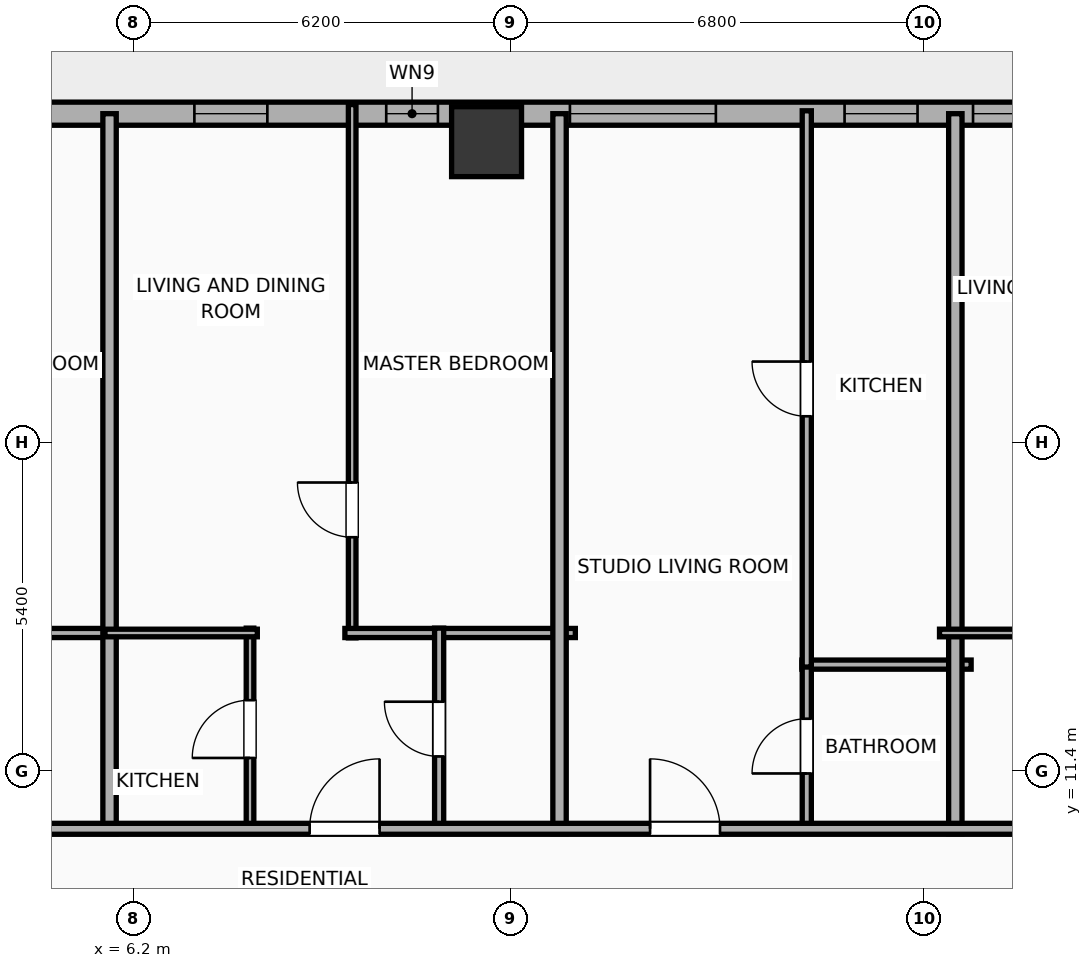
"""IFC4 building model, lengths in metres.
Left out: names, types, materials, properties, quantities, classifications, styles, units other than length and angle.
Written with IfcOpenShell. Run it as: python <this file> out.ifc"""

import sys

from ifc_helpers import new_model, si_unit, direction, frame, frame_2d, origin, origin_2d, place, context, subcontext, project, spatial, rectangle, hollow_rectangle, extrude, element, fill, save


model = new_model("IFC4")
c1 = context("Model", 3, precision=1e-05, world=origin(), true_north=direction((0.0, 1.0)))
c2 = subcontext(c1, "Body", "Model", "MODEL_VIEW")
j1 = project(units=[si_unit("LENGTHUNIT", "METRE"), si_unit("PLANEANGLEUNIT", "RADIAN")], contexts=[c1])
p1 = place(None, origin())
s1 = spatial("IfcSite", under=j1, at=p1, CompositionType="ELEMENT")
p2 = place(p1, origin())
s2 = spatial("IfcBuilding", under=s1, at=p2, CompositionType="ELEMENT")
p3 = place(p2, frame((0.0, 0.0, 26.0)))
s3 = spatial("IfcBuildingStorey", under=s2, at=p3, CompositionType="ELEMENT", Elevation=26.0)
p4 = place(p3, frame((12.0, 21.75, -0.25), z_axis=(0.0, 0.0, 1.0), x_axis=(1.0, 0.0, 0.0)))
e1 = element("IfcColumn", 1, at=p4, inside=s3, PredefinedType="COLUMN", context=c2, shape_type="SweptSolid", body=[
    extrude(hollow_rectangle(XDim=1.15, YDim=1.15, WallThickness=0.04, at=origin_2d()), origin(), (0.0, 0.0, 1.0), 4.15),
])
p5 = place(p3, frame((-29.581, 22.21, 0.0), z_axis=(0.0, 0.0, 1.0), x_axis=(1.0, 0.0, 0.0)))
e2 = element("IfcWall", 2, at=p5, inside=s3, PredefinedType="ELEMENTEDWALL", context=c2, shape_type="SweptSolid", body=[
    extrude(rectangle(XDim=51.963, YDim=0.38, at=frame_2d((25.981, 0.0))), origin(), (0.0, 0.0, 1.0), 2.54),
])
p6 = place(p5, frame((6.61, 0.0, 0.75)))
e3 = element("IfcOpeningElement", 3, at=p6, cuts=e2, PredefinedType="OPENING", context=c2, shape_type="SweptSolid", body=[
    extrude(rectangle(XDim=2.4, YDim=1.63, at=frame_2d((1.2, 0.815))), frame((0.0, 0.2, 0.0), z_axis=(0.0, -1.0, 0.0), x_axis=(1.0, 0.0, 0.0)), (0.0, 0.0, 1.0), 0.4),
])
p7 = place(p5, frame((24.781, 0.0, 0.75)))
e4 = element("IfcOpeningElement", 4, at=p7, cuts=e2, PredefinedType="OPENING", context=c2, shape_type="SweptSolid", body=[
    extrude(rectangle(XDim=2.4, YDim=1.63, at=frame_2d((1.2, 0.815))), frame((0.0, 0.2, 0.0), z_axis=(0.0, -1.0, 0.0), x_axis=(1.0, 0.0, 0.0)), (0.0, 0.0, 1.0), 0.4),
])
p8 = place(p5, frame((42.952, 0.0, 0.75)))
e5 = element("IfcOpeningElement", 5, at=p8, cuts=e2, PredefinedType="OPENING", context=c2, shape_type="SweptSolid", body=[
    extrude(rectangle(XDim=2.4, YDim=1.63, at=frame_2d((1.2, 0.815))), frame((0.0, 0.2, 0.0), z_axis=(0.0, -1.0, 0.0), x_axis=(1.0, 0.0, 0.0)), (0.0, 0.0, 1.0), 0.4),
])
p9 = place(p5, frame((3.476, 0.0, 0.75)))
e6 = element("IfcOpeningElement", 6, at=p9, cuts=e2, PredefinedType="OPENING", context=c2, shape_type="SweptSolid", body=[
    extrude(rectangle(XDim=1.2, YDim=1.63, at=frame_2d((0.6, 0.815))), frame((0.0, 0.2, 0.0), z_axis=(0.0, -1.0, 0.0), x_axis=(1.0, 0.0, 0.0)), (0.0, 0.0, 1.0), 0.4),
])
p10 = place(p5, frame((11.236, 0.0, 0.75)))
e7 = element("IfcOpeningElement", 7, at=p10, cuts=e2, PredefinedType="OPENING", context=c2, shape_type="SweptSolid", body=[
    extrude(rectangle(XDim=1.2, YDim=1.63, at=frame_2d((0.6, 0.815))), frame((0.0, 0.2, 0.0), z_axis=(0.0, -1.0, 0.0), x_axis=(1.0, 0.0, 0.0)), (0.0, 0.0, 1.0), 0.4),
])
p11 = place(p5, frame((14.576, 0.0, 0.75)))
e8 = element("IfcOpeningElement", 8, at=p11, cuts=e2, PredefinedType="OPENING", context=c2, shape_type="SweptSolid", body=[
    extrude(rectangle(XDim=1.2, YDim=1.63, at=frame_2d((0.6, 0.815))), frame((0.0, 0.2, 0.0), z_axis=(0.0, -1.0, 0.0), x_axis=(1.0, 0.0, 0.0)), (0.0, 0.0, 1.0), 0.4),
])
p12 = place(p5, frame((18.276, 0.0, 0.75)))
e9 = element("IfcOpeningElement", 9, at=p12, cuts=e2, PredefinedType="OPENING", context=c2, shape_type="SweptSolid", body=[
    extrude(rectangle(XDim=1.2, YDim=1.63, at=frame_2d((0.6, 0.815))), frame((0.0, 0.2, 0.0), z_axis=(0.0, -1.0, 0.0), x_axis=(1.0, 0.0, 0.0)), (0.0, 0.0, 1.0), 0.4),
])
p13 = place(p5, frame((21.976, 0.0, 0.75)))
e10 = element("IfcOpeningElement", 10, at=p13, cuts=e2, PredefinedType="OPENING", context=c2, shape_type="SweptSolid", body=[
    extrude(rectangle(XDim=1.2, YDim=1.63, at=frame_2d((0.6, 0.815))), frame((0.0, 0.2, 0.0), z_axis=(0.0, -1.0, 0.0), x_axis=(1.0, 0.0, 0.0)), (0.0, 0.0, 1.0), 0.4),
])
p14 = place(p5, frame((29.136, 0.0, 0.75)))
e11 = element("IfcOpeningElement", 11, at=p14, cuts=e2, PredefinedType="OPENING", context=c2, shape_type="SweptSolid", body=[
    extrude(rectangle(XDim=1.2, YDim=1.63, at=frame_2d((0.6, 0.815))), frame((0.0, 0.2, 0.0), z_axis=(0.0, -1.0, 0.0), x_axis=(1.0, 0.0, 0.0)), (0.0, 0.0, 1.0), 0.4),
])
p15 = place(p5, frame((33.076, 0.0, 0.75)))
e12 = element("IfcOpeningElement", 12, at=p15, cuts=e2, PredefinedType="OPENING", context=c2, shape_type="SweptSolid", body=[
    extrude(rectangle(XDim=1.2, YDim=1.63, at=frame_2d((0.6, 0.815))), frame((0.0, 0.2, 0.0), z_axis=(0.0, -1.0, 0.0), x_axis=(1.0, 0.0, 0.0)), (0.0, 0.0, 1.0), 0.4),
])
p16 = place(p5, frame((36.776, 0.0, 0.75)))
e13 = element("IfcOpeningElement", 13, at=p16, cuts=e2, PredefinedType="OPENING", context=c2, shape_type="SweptSolid", body=[
    extrude(rectangle(XDim=1.2, YDim=1.63, at=frame_2d((0.6, 0.815))), frame((0.0, 0.2, 0.0), z_axis=(0.0, -1.0, 0.0), x_axis=(1.0, 0.0, 0.0)), (0.0, 0.0, 1.0), 0.4),
])
p17 = place(p5, frame((39.931, 0.0, 0.75)))
e14 = element("IfcOpeningElement", 14, at=p17, cuts=e2, PredefinedType="OPENING", context=c2, shape_type="SweptSolid", body=[
    extrude(rectangle(XDim=0.85, YDim=1.63, at=frame_2d((0.425, 0.815))), frame((0.0, 0.2, 0.0), z_axis=(0.0, -1.0, 0.0), x_axis=(1.0, 0.0, 0.0)), (0.0, 0.0, 1.0), 0.4),
])
p18 = place(p5, frame((47.469, 0.0, 0.75)))
e15 = element("IfcOpeningElement", 15, at=p18, cuts=e2, PredefinedType="OPENING", context=c2, shape_type="SweptSolid", body=[
    extrude(rectangle(XDim=1.2, YDim=1.63, at=frame_2d((0.6, 0.815))), frame((0.0, 0.2, 0.0), z_axis=(0.0, -1.0, 0.0), x_axis=(1.0, 0.0, 0.0)), (0.0, 0.0, 1.0), 0.4),
])
p19 = place(p5, frame((49.581, 0.0, 0.75)))
e16 = element("IfcOpeningElement", 16, at=p19, cuts=e2, PredefinedType="OPENING", context=c2, shape_type="SweptSolid", body=[
    extrude(rectangle(XDim=1.2, YDim=1.63, at=frame_2d((0.6, 0.815))), frame((0.0, 0.2, 0.0), z_axis=(0.0, -1.0, 0.0), x_axis=(1.0, 0.0, 0.0)), (0.0, 0.0, 1.0), 0.4),
])
p20 = place(p3, frame((2.27, 13.67, 0.0), z_axis=(0.0, 0.0, 1.0), x_axis=(1.0, 0.0, 0.0)))
e17 = element("IfcWall", 17, at=p20, inside=s3, PredefinedType="PLUMBINGWALL", context=c2, shape_type="SweptSolid", body=[
    extrude(rectangle(XDim=3.605, YDim=0.15, at=frame_2d((1.802, 0.0))), origin(), (0.0, 0.0, 1.0), 3.65),
])
p21 = place(p3, frame((5.8, 10.37, 0.0), z_axis=(0.0, 0.0, 1.0), x_axis=(0.0, 1.0, 0.0)))
e18 = element("IfcWall", 18, at=p21, inside=s3, PredefinedType="PARTITIONING", context=c2, shape_type="SweptSolid", body=[
    extrude(rectangle(XDim=11.84, YDim=0.22, at=frame_2d((5.92, 0.0))), origin(), (0.0, 0.0, 1.0), 3.65),
])
p22 = place(p3, frame((9.79, 13.59, 0.0), z_axis=(0.0, 0.0, 1.0), x_axis=(0.0, 1.0, 0.0)))
e19 = element("IfcWall", 19, at=p22, inside=s3, PredefinedType="PARTITIONING", context=c2, shape_type="SweptSolid", body=[
    extrude(rectangle(XDim=8.77, YDim=0.125, at=frame_2d((4.385, 0.0))), origin(), (0.0, 0.0, 1.0), 3.65),
])
p23 = place(p22, frame((1.655, 0.0, 0.0)))
e20 = element("IfcOpeningElement", 20, at=p23, cuts=e19, PredefinedType="OPENING", context=c2, shape_type="SweptSolid", body=[
    extrude(rectangle(XDim=0.9, YDim=2.05, at=frame_2d((0.45, 1.025))), frame((0.0, 0.073, 0.0), z_axis=(0.0, -1.0, 0.0), x_axis=(1.0, 0.0, 0.0)), (0.0, 0.0, 1.0), 0.145),
])
p24 = place(p3, frame((9.67, 13.67, 0.0), z_axis=(0.0, 0.0, 1.0), x_axis=(1.0, 0.0, 0.0)))
e21 = element("IfcWall", 21, at=p24, inside=s3, PredefinedType="PLUMBINGWALL", context=c2, shape_type="SweptSolid", body=[
    extrude(rectangle(XDim=3.79, YDim=0.15, at=frame_2d((1.895, 0.0))), origin(), (0.0, 0.0, 1.0), 3.65),
])
p25 = place(p3, frame((8.11, 10.43, 0.0), z_axis=(0.0, 0.0, 1.0), x_axis=(0.0, 1.0, 0.0)))
e22 = element("IfcWall", 22, at=p25, inside=s3, PredefinedType="PARTITIONING", context=c2, shape_type="SweptSolid", body=[
    extrude(rectangle(XDim=3.32, YDim=0.125, at=frame_2d((1.66, 0.0))), origin(), (0.0, 0.0, 1.0), 3.65),
])
p26 = place(p25, frame((1.185, 0.0, 0.0)))
e23 = element("IfcOpeningElement", 23, at=p26, cuts=e22, PredefinedType="OPENING", context=c2, shape_type="SweptSolid", body=[
    extrude(rectangle(XDim=0.95, YDim=2.05, at=frame_2d((0.475, 1.025))), frame((0.0, 0.073, 0.0), z_axis=(0.0, -1.0, 0.0), x_axis=(1.0, 0.0, 0.0)), (0.0, 0.0, 1.0), 0.145),
])
p27 = place(p3, frame((5.725, 13.67, 0.0), z_axis=(0.0, 0.0, 1.0), x_axis=(1.0, 0.0, 0.0)))
e24 = element("IfcWall", 24, at=p27, inside=s3, PredefinedType="PARTITIONING", context=c2, shape_type="SweptSolid", body=[
    extrude(rectangle(XDim=2.505, YDim=0.125, at=frame_2d((1.252, 0.0))), origin(), (0.0, 0.0, 1.0), 3.65),
])
p28 = place(p3, frame((11.22, 10.43, 0.0), z_axis=(0.0, 0.0, 1.0), x_axis=(0.0, 1.0, 0.0)))
e25 = element("IfcWall", 25, at=p28, inside=s3, PredefinedType="PLUMBINGWALL", context=c2, shape_type="SweptSolid", body=[
    extrude(rectangle(XDim=3.32, YDim=0.15, at=frame_2d((1.66, 0.0))), origin(), (0.0, 0.0, 1.0), 3.65),
])
p29 = place(p28, frame((1.21, 0.0, 0.0)))
e26 = element("IfcOpeningElement", 26, at=p29, cuts=e25, PredefinedType="OPENING", context=c2, shape_type="SweptSolid", body=[
    extrude(rectangle(XDim=0.9, YDim=2.05, at=frame_2d((0.45, 1.025))), frame((0.0, 0.085, 0.0), z_axis=(0.0, -1.0, 0.0), x_axis=(1.0, 0.0, 0.0)), (0.0, 0.0, 1.0), 0.17),
])
p30 = place(p3, frame((13.2, 10.37, 0.0), z_axis=(0.0, 0.0, 1.0), x_axis=(0.0, 1.0, 0.0)))
e27 = element("IfcWall", 27, at=p30, inside=s3, PredefinedType="PARTITIONING", context=c2, shape_type="SweptSolid", body=[
    extrude(rectangle(XDim=11.84, YDim=0.22, at=frame_2d((5.92, 0.0))), origin(), (0.0, 0.0, 1.0), 3.65),
])
p31 = place(p3, frame((17.186, 13.15, 0.0), z_axis=(0.0, 0.0, 1.0), x_axis=(1.0, 0.0, 0.0)))
e28 = element("IfcWall", 28, at=p31, inside=s3, PredefinedType="PLUMBINGWALL", context=c2, shape_type="SweptSolid", body=[
    extrude(rectangle(XDim=2.783, YDim=0.15, at=frame_2d((1.392, 0.0))), origin(), (0.0, 0.0, 1.0), 3.65),
])
p32 = place(p3, frame((17.266, 10.43, 0.0), z_axis=(0.0, 0.0, 1.0), x_axis=(0.0, 1.0, 0.0)))
e29 = element("IfcWall", 29, at=p32, inside=s3, PredefinedType="PLUMBINGWALL", context=c2, shape_type="SweptSolid", body=[
    extrude(rectangle(XDim=2.76, YDim=0.15, at=frame_2d((1.38, 0.0))), origin(), (0.0, 0.0, 1.0), 3.65),
])
p33 = place(p32, frame((0.93, 0.0, 0.0)))
e30 = element("IfcOpeningElement", 30, at=p33, cuts=e29, PredefinedType="OPENING", context=c2, shape_type="SweptSolid", body=[
    extrude(rectangle(XDim=0.9, YDim=2.05, at=frame_2d((0.45, 1.025))), frame((0.0, 0.085, 0.0), z_axis=(0.0, -1.0, 0.0), x_axis=(1.0, 0.0, 0.0)), (0.0, 0.0, 1.0), 0.17),
])
p34 = place(p3, frame((17.266, 13.11, 0.0), z_axis=(0.0, 0.0, 1.0), x_axis=(0.0, 1.0, 0.0)))
e31 = element("IfcWall", 31, at=p34, inside=s3, PredefinedType="PLUMBINGWALL", context=c2, shape_type="SweptSolid", body=[
    extrude(rectangle(XDim=9.147, YDim=0.15, at=frame_2d((4.574, 0.0))), origin(), (0.0, 0.0, 1.0), 3.65),
])
p35 = place(p34, frame((4.124, 0.0, 0.0)))
e32 = element("IfcOpeningElement", 32, at=p35, cuts=e31, PredefinedType="OPENING", context=c2, shape_type="SweptSolid", body=[
    extrude(rectangle(XDim=0.9, YDim=2.05, at=frame_2d((0.45, 1.025))), frame((0.0, 0.085, 0.0), z_axis=(0.0, -1.0, 0.0), x_axis=(1.0, 0.0, 0.0)), (0.0, 0.0, 1.0), 0.17),
])
p36 = place(p3, frame((19.709, 10.37, 0.0), z_axis=(0.0, 0.0, 1.0), x_axis=(0.0, 1.0, 0.0)))
e33 = element("IfcWall", 33, at=p36, inside=s3, PredefinedType="PARTITIONING", context=c2, shape_type="SweptSolid", body=[
    extrude(rectangle(XDim=11.84, YDim=0.22, at=frame_2d((5.92, 0.0))), origin(), (0.0, 0.0, 1.0), 3.65),
])
p37 = place(p3, frame((19.449, 13.67, 0.0), z_axis=(0.0, 0.0, 1.0), x_axis=(1.0, 0.0, 0.0)))
e34 = element("IfcWall", 34, at=p37, inside=s3, PredefinedType="PARTITIONING", context=c2, shape_type="SweptSolid", body=[
    extrude(rectangle(XDim=2.69, YDim=0.125, at=frame_2d((1.345, 0.0))), origin(), (0.0, 0.0, 1.0), 3.65),
])
p38 = place(p3, frame((-33.41, 10.45, 0.0), z_axis=(0.0, 0.0, 1.0), x_axis=(1.0, 0.0, 0.0)))
e35 = element("IfcWall", 35, at=p38, inside=s3, PredefinedType="PARTITIONING", context=c2, shape_type="SweptSolid", body=[
    extrude(rectangle(XDim=59.62, YDim=0.18, at=frame_2d((29.81, 0.0))), origin(), (0.0, 0.0, 1.0), 3.65),
])
p39 = place(p38, frame((4.529, 0.0, 0.0)))
e36 = element("IfcOpeningElement", 36, at=p39, cuts=e35, PredefinedType="OPENING", context=c2, shape_type="SweptSolid", body=[
    extrude(rectangle(XDim=1.15, YDim=2.05, at=frame_2d((0.575, 1.025))), frame((0.0, 0.1, 0.0), z_axis=(0.0, -1.0, 0.0), x_axis=(1.0, 0.0, 0.0)), (0.0, 0.0, 1.0), 0.2),
])
p40 = place(p38, frame((12.899, 0.0, 0.0)))
e37 = element("IfcOpeningElement", 37, at=p40, cuts=e35, PredefinedType="OPENING", context=c2, shape_type="SweptSolid", body=[
    extrude(rectangle(XDim=1.15, YDim=2.05, at=frame_2d((0.575, 1.025))), frame((0.0, 0.1, 0.0), z_axis=(0.0, -1.0, 0.0), x_axis=(1.0, 0.0, 0.0)), (0.0, 0.0, 1.0), 0.2),
])
p41 = place(p38, frame((20.298, 0.0, 0.0)))
e38 = element("IfcOpeningElement", 38, at=p41, cuts=e35, PredefinedType="OPENING", context=c2, shape_type="SweptSolid", body=[
    extrude(rectangle(XDim=1.15, YDim=2.05, at=frame_2d((0.575, 1.025))), frame((0.0, 0.1, 0.0), z_axis=(0.0, -1.0, 0.0), x_axis=(1.0, 0.0, 0.0)), (0.0, 0.0, 1.0), 0.2),
])
p42 = place(p38, frame((27.703, 0.0, 0.0)))
e39 = element("IfcOpeningElement", 39, at=p42, cuts=e35, PredefinedType="OPENING", context=c2, shape_type="SweptSolid", body=[
    extrude(rectangle(XDim=1.15, YDim=2.05, at=frame_2d((0.575, 1.025))), frame((0.0, 0.1, 0.0), z_axis=(0.0, -1.0, 0.0), x_axis=(1.0, 0.0, 0.0)), (0.0, 0.0, 1.0), 0.2),
])
p43 = place(p38, frame((35.102, 0.0, 0.0)))
e40 = element("IfcOpeningElement", 40, at=p43, cuts=e35, PredefinedType="OPENING", context=c2, shape_type="SweptSolid", body=[
    extrude(rectangle(XDim=1.15, YDim=2.05, at=frame_2d((0.575, 1.025))), frame((0.0, 0.1, 0.0), z_axis=(0.0, -1.0, 0.0), x_axis=(1.0, 0.0, 0.0)), (0.0, 0.0, 1.0), 0.2),
])
p44 = place(p38, frame((42.5, 0.0, 0.0)))
e41 = element("IfcOpeningElement", 41, at=p44, cuts=e35, PredefinedType="OPENING", context=c2, shape_type="SweptSolid", body=[
    extrude(rectangle(XDim=1.15, YDim=2.05, at=frame_2d((0.575, 1.025))), frame((0.0, 0.1, 0.0), z_axis=(0.0, -1.0, 0.0), x_axis=(1.0, 0.0, 0.0)), (0.0, 0.0, 1.0), 0.2),
])
p45 = place(p38, frame((48.099, 0.0, 0.0)))
e42 = element("IfcOpeningElement", 42, at=p45, cuts=e35, PredefinedType="OPENING", context=c2, shape_type="SweptSolid", body=[
    extrude(rectangle(XDim=1.15, YDim=2.05, at=frame_2d((0.575, 1.025))), frame((0.0, 0.1, 0.0), z_axis=(0.0, -1.0, 0.0), x_axis=(1.0, 0.0, 0.0)), (0.0, 0.0, 1.0), 0.2),
])
p46 = place(p38, frame((56.117, 0.0, 0.0)))
e43 = element("IfcOpeningElement", 43, at=p46, cuts=e35, PredefinedType="OPENING", context=c2, shape_type="SweptSolid", body=[
    extrude(rectangle(XDim=0.9, YDim=2.05, at=frame_2d((0.45, 1.025))), frame((0.0, 0.1, 0.0), z_axis=(0.0, -1.0, 0.0), x_axis=(1.0, 0.0, 0.0)), (0.0, 0.0, 1.0), 0.2),
])
p47 = place(p8, origin())
e44 = element("IfcWindow", 44, at=p47, inside=s3, PartitioningType="SINGLE_PANEL", PredefinedType="WINDOW", context=c2, shape_type="SweptSolid", body=[
    extrude(rectangle(XDim=2.4, YDim=1.63, at=frame_2d((1.2, 0.815))), frame((0.0, 0.03, 0.0), z_axis=(0.0, -1.0, 0.0), x_axis=(1.0, 0.0, 0.0)), (0.0, 0.0, 1.0), 0.06),
])
fill(e5, e44)
p48 = place(p16, origin())
e45 = element("IfcWindow", 45, at=p48, inside=s3, PartitioningType="SINGLE_PANEL", PredefinedType="WINDOW", context=c2, shape_type="SweptSolid", body=[
    extrude(rectangle(XDim=1.2, YDim=1.63, at=frame_2d((0.6, 0.815))), frame((0.0, 0.03, 0.0), z_axis=(0.0, -1.0, 0.0), x_axis=(1.0, 0.0, 0.0)), (0.0, 0.0, 1.0), 0.06),
])
fill(e13, e45)
p49 = place(p17, origin())
e46 = element("IfcWindow", 46, at=p49, inside=s3, PartitioningType="SINGLE_PANEL", PredefinedType="WINDOW", context=c2, shape_type="SweptSolid", body=[
    extrude(rectangle(XDim=0.85, YDim=1.63, at=frame_2d((0.425, 0.815))), frame((0.0, 0.03, 0.0), z_axis=(0.0, -1.0, 0.0), x_axis=(1.0, 0.0, 0.0)), (0.0, 0.0, 1.0), 0.06),
])
fill(e14, e46)
p50 = place(p18, origin())
e47 = element("IfcWindow", 47, at=p50, inside=s3, PartitioningType="SINGLE_PANEL", PredefinedType="WINDOW", context=c2, shape_type="SweptSolid", body=[
    extrude(rectangle(XDim=1.2, YDim=1.63, at=frame_2d((0.6, 0.815))), frame((0.0, 0.03, 0.0), z_axis=(0.0, -1.0, 0.0), x_axis=(1.0, 0.0, 0.0)), (0.0, 0.0, 1.0), 0.06),
])
fill(e15, e47)
p51 = place(p19, origin())
e48 = element("IfcWindow", 48, at=p51, inside=s3, PartitioningType="SINGLE_PANEL", PredefinedType="WINDOW", context=c2, shape_type="SweptSolid", body=[
    extrude(rectangle(XDim=1.2, YDim=1.63, at=frame_2d((0.6, 0.815))), frame((0.0, 0.03, 0.0), z_axis=(0.0, -1.0, 0.0), x_axis=(1.0, 0.0, 0.0)), (0.0, 0.0, 1.0), 0.06),
])
fill(e16, e48)
p52 = place(p23, origin())
e49 = element("IfcDoor", 49, at=p52, inside=s3, OperationType="SINGLE_SWING_RIGHT", PredefinedType="DOOR", context=c2, shape_type="SweptSolid", body=[
    extrude(rectangle(XDim=0.9, YDim=2.05, at=frame_2d((0.45, 1.025))), frame((0.0, 0.025, 0.0), z_axis=(0.0, -1.0, 0.0), x_axis=(1.0, 0.0, 0.0)), (0.0, 0.0, 1.0), 0.05),
])
fill(e20, e49)
p53 = place(p26, origin())
e50 = element("IfcDoor", 50, at=p53, inside=s3, OperationType="SINGLE_SWING_LEFT", PredefinedType="DOOR", context=c2, shape_type="SweptSolid", body=[
    extrude(rectangle(XDim=0.95, YDim=2.05, at=frame_2d((0.475, 1.025))), frame((0.0, 0.025, 0.0), z_axis=(0.0, -1.0, 0.0), x_axis=(1.0, 0.0, 0.0)), (0.0, 0.0, 1.0), 0.05),
])
fill(e23, e50)
p54 = place(p29, origin())
e51 = element("IfcDoor", 51, at=p54, inside=s3, OperationType="SINGLE_SWING_RIGHT", PredefinedType="DOOR", context=c2, shape_type="SweptSolid", body=[
    extrude(rectangle(XDim=0.9, YDim=2.05, at=frame_2d((0.45, 1.025))), frame((0.0, 0.025, 0.0), z_axis=(0.0, -1.0, 0.0), x_axis=(1.0, 0.0, 0.0)), (0.0, 0.0, 1.0), 0.05),
])
fill(e26, e51)
p55 = place(p33, origin())
e52 = element("IfcDoor", 52, at=p55, inside=s3, OperationType="SINGLE_SWING_LEFT", PredefinedType="DOOR", context=c2, shape_type="SweptSolid", body=[
    extrude(rectangle(XDim=0.9, YDim=2.05, at=frame_2d((0.45, 1.025))), frame((0.0, 0.025, 0.0), z_axis=(0.0, -1.0, 0.0), x_axis=(1.0, 0.0, 0.0)), (0.0, 0.0, 1.0), 0.05),
])
fill(e30, e52)
p56 = place(p35, origin())
e53 = element("IfcDoor", 53, at=p56, inside=s3, OperationType="SINGLE_SWING_RIGHT", PredefinedType="DOOR", context=c2, shape_type="SweptSolid", body=[
    extrude(rectangle(XDim=0.9, YDim=2.05, at=frame_2d((0.45, 1.025))), frame((0.0, 0.025, 0.0), z_axis=(0.0, -1.0, 0.0), x_axis=(1.0, 0.0, 0.0)), (0.0, 0.0, 1.0), 0.05),
])
fill(e32, e53)
p57 = place(p44, origin())
e54 = element("IfcDoor", 54, at=p57, inside=s3, OperationType="SINGLE_SWING_RIGHT", PredefinedType="DOOR", context=c2, shape_type="SweptSolid", body=[
    extrude(rectangle(XDim=1.15, YDim=2.05, at=frame_2d((0.575, 1.025))), frame((0.0, 0.025, 0.0), z_axis=(0.0, -1.0, 0.0), x_axis=(1.0, 0.0, 0.0)), (0.0, 0.0, 1.0), 0.05),
])
fill(e41, e54)
p58 = place(p45, origin())
e55 = element("IfcDoor", 55, at=p58, inside=s3, OperationType="SINGLE_SWING_LEFT", PredefinedType="DOOR", context=c2, shape_type="SweptSolid", body=[
    extrude(rectangle(XDim=1.15, YDim=2.05, at=frame_2d((0.575, 1.025))), frame((0.0, 0.025, 0.0), z_axis=(0.0, -1.0, 0.0), x_axis=(1.0, 0.0, 0.0)), (0.0, 0.0, 1.0), 0.05),
])
fill(e42, e55)
save(model, sys.argv[1])
